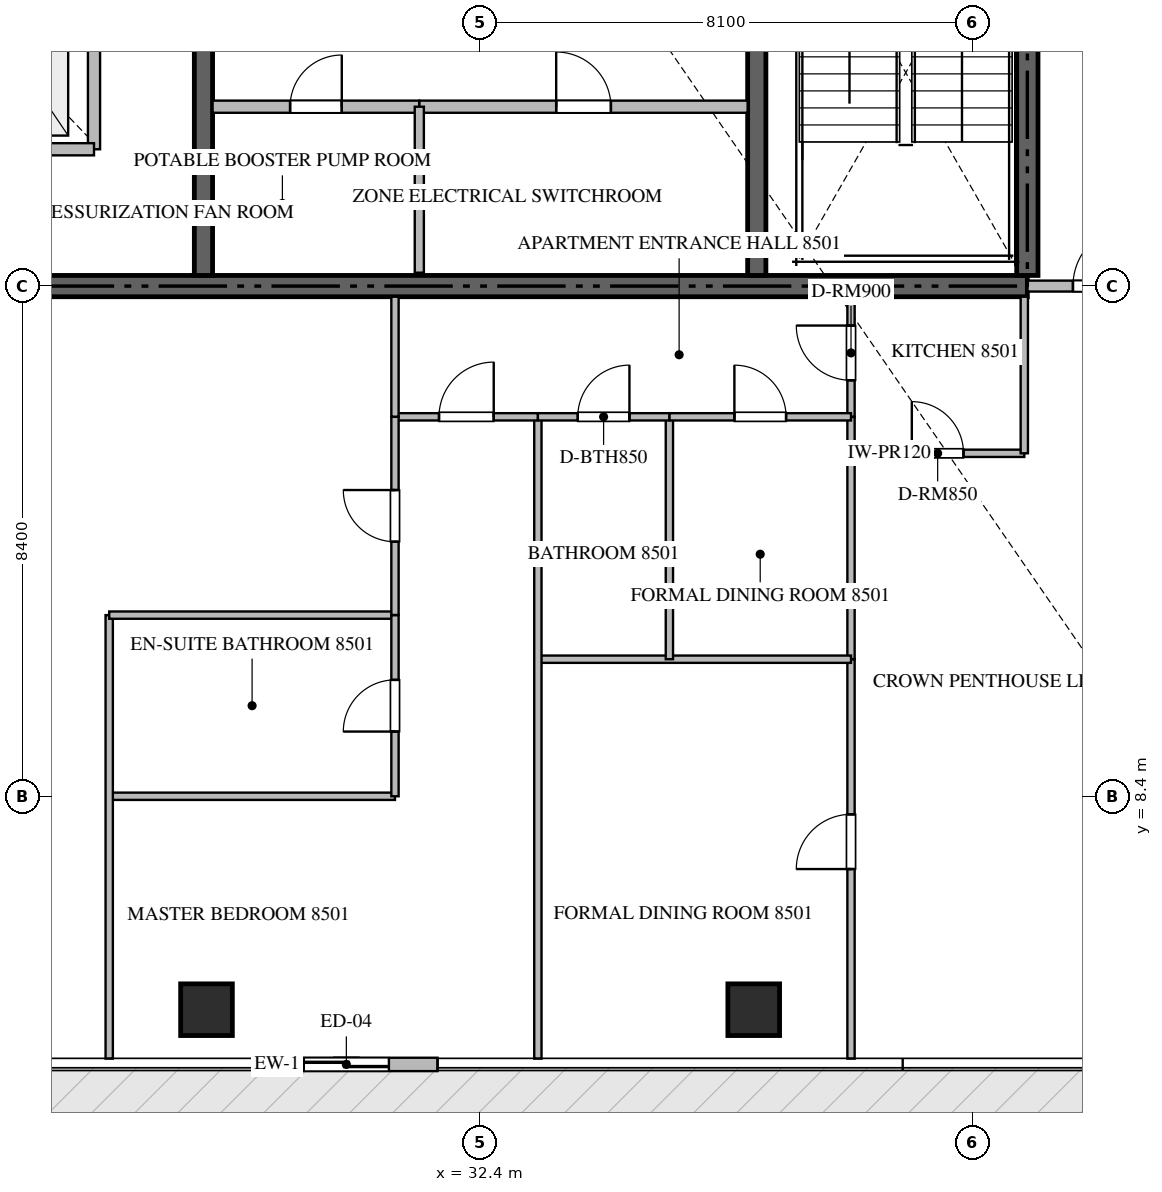
"""IFC4 building model, lengths in metres.
Left out: names, types, materials, properties, quantities, classifications, styles, units other than length and angle.
Written with IfcOpenShell. Run it as: python <this file> out.ifc"""

import sys

from ifc_helpers import new_model, si_unit, direction, frame, frame_2d, origin, origin_2d, place, context, subcontext, project, spatial, rectangle, extrude, source, transform, mapped, element, fill, save


model = new_model("IFC4")
c1 = context("Model", 3, precision=1e-05, world=origin(), true_north=direction((0.0, 1.0)))
c2 = subcontext(c1, "Body", "Model", "MODEL_VIEW")
j1 = project(units=[si_unit("LENGTHUNIT", "METRE"), si_unit("PLANEANGLEUNIT", "RADIAN")], contexts=[c1])
p1 = place(None, origin())
s1 = spatial("IfcSite", under=j1, at=p1, CompositionType="ELEMENT")
p2 = place(p1, origin())
s2 = spatial("IfcBuilding", under=s1, at=p2, CompositionType="ELEMENT")
p3 = place(p2, frame((0.0, 0.0, 342.05)))
s3 = spatial("IfcBuildingStorey", under=s2, at=p3, CompositionType="ELEMENT", Elevation=342.05)
p4 = place(p3, frame((23.4, 16.8, -0.26), z_axis=(0.0, 0.0, 1.0), x_axis=(1.0, 0.0, 0.0)))
e1 = element("IfcWall", 1, at=p4, inside=s3, PredefinedType="SHEAR", context=c2, shape_type="SweptSolid", body=[
    extrude(rectangle(XDim=18.0, YDim=0.35, at=frame_2d((9.0, 0.0))), origin(), (0.0, 0.0, 1.0), 5.898),
])
p5 = place(p3, frame((41.4, 16.975, -0.26), z_axis=(0.0, 0.0, 1.0), x_axis=(0.0, 1.0, 0.0)))
e2 = element("IfcWall", 2, at=p5, inside=s3, PredefinedType="SHEAR", context=c2, shape_type="SweptSolid", body=[
    extrude(rectangle(XDim=8.375, YDim=0.35, at=frame_2d((4.188, 0.0))), origin(), (0.0, 0.0, 1.0), 5.898),
])
p6 = place(p3, frame((27.85, 16.975, -0.26), z_axis=(0.0, 0.0, 1.0), x_axis=(0.0, 1.0, 0.0)))
e3 = element("IfcWall", 3, at=p6, inside=s3, PredefinedType="SHEAR", context=c2, shape_type="SweptSolid", body=[
    extrude(rectangle(XDim=4.875, YDim=0.3, at=frame_2d((2.438, 0.0))), origin(), (0.0, 0.0, 1.0), 5.898),
])
p7 = place(p3, frame((36.95, 16.975, -0.26), z_axis=(0.0, 0.0, 1.0), x_axis=(0.0, 1.0, 0.0)))
e4 = element("IfcWall", 4, at=p7, inside=s3, PredefinedType="SHEAR", context=c2, shape_type="SweptSolid", body=[
    extrude(rectangle(XDim=8.375, YDim=0.3, at=frame_2d((4.188, 0.0))), origin(), (0.0, 0.0, 1.0), 5.898),
])
m1 = source(origin(), c2, "Body", "SweptSolid", [
    extrude(rectangle(XDim=0.85, YDim=0.85, at=origin_2d()), origin(), (0.0, 0.0, 1.0), 5.9),
])
for number, where, z_axis, x_axis in (
    (5, (27.9, 4.9, -0.26), (0.0, 0.0, 1.0), (1.0, 0.0, 0.0)),
    (6, (36.9, 4.9, -0.26), (0.0, 0.0, 1.0), (1.0, 0.0, 0.0)),
):
    element("IfcColumn", number, at=place(p3, frame(where, z_axis=z_axis, x_axis=x_axis)), inside=s3, PredefinedType="COLUMN", context=c2, shape_type="MappedRepresentation", body=[
        mapped(m1, transform((0.0, 0.0, 0.0), scale=1.0)),
    ])
p8 = place(p3, frame((28.7, 4.0, 0.0), z_axis=(0.0, 0.0, 1.0), x_axis=(1.0, 0.0, 0.0)))
e7 = element("IfcWall", 7, at=p8, inside=s3, PredefinedType="ELEMENTEDWALL", context=c2, shape_type="SweptSolid", body=[
    extrude(rectangle(XDim=3.0, YDim=0.22, at=frame_2d((1.5, 0.0))), origin(), (0.0, 0.0, 1.0), 5.625),
])
p9 = place(p8, frame((0.8, 0.0, 0.0)))
e8 = element("IfcOpeningElement", 8, at=p9, cuts=e7, PredefinedType="OPENING", context=c2, shape_type="SweptSolid", body=[
    extrude(rectangle(XDim=1.4, YDim=2.25, at=frame_2d((0.7, 1.125))), frame((0.0, 0.12, 0.0), z_axis=(0.0, -1.0, 0.0), x_axis=(1.0, 0.0, 0.0)), (0.0, 0.0, 1.0), 0.24),
])
p10 = place(p3, frame((26.05, 19.05, 0.0), z_axis=(0.0, 0.0, 1.0), x_axis=(0.0, 1.0, 0.0)))
e9 = element("IfcWall", 9, at=p10, inside=s3, PredefinedType="STANDARD", context=c2, shape_type="SweptSolid", body=[
    extrude(rectangle(XDim=2.5, YDim=0.2, at=frame_2d((1.25, 0.0))), origin(), (0.0, 0.0, 1.0), 5.64),
])
p11 = place(p3, frame((23.575, 19.05, 0.0), z_axis=(0.0, 0.0, 1.0), x_axis=(1.0, 0.0, 0.0)))
e10 = element("IfcWall", 10, at=p11, inside=s3, PredefinedType="STANDARD", context=c2, shape_type="SweptSolid", body=[
    extrude(rectangle(XDim=2.475, YDim=0.2, at=frame_2d((1.238, 0.0))), origin(), (0.0, 0.0, 1.0), 5.64),
])
p12 = place(p3, frame((28.0, 19.75, 0.0), z_axis=(0.0, 0.0, 1.0), x_axis=(1.0, 0.0, 0.0)))
e11 = element("IfcWall", 11, at=p12, inside=s3, PredefinedType="STANDARD", context=c2, shape_type="SweptSolid", body=[
    extrude(rectangle(XDim=3.4, YDim=0.2, at=frame_2d((1.7, 0.0))), origin(), (0.0, 0.0, 1.0), 5.64),
])
p13 = place(p12, frame((1.275, 0.0, 0.0)))
e12 = element("IfcOpeningElement", 12, at=p13, cuts=e11, PredefinedType="OPENING", context=c2, shape_type="SweptSolid", body=[
    extrude(rectangle(XDim=0.85, YDim=2.1, at=frame_2d((0.425, 1.05))), frame((0.0, 0.11, 0.0), z_axis=(0.0, -1.0, 0.0), x_axis=(1.0, 0.0, 0.0)), (0.0, 0.0, 1.0), 0.22),
])
p14 = place(p3, frame((31.402, 19.75, 0.0), z_axis=(0.0, 0.0, 1.0), x_axis=(1.0, 0.0, 0.0)))
e13 = element("IfcWall", 13, at=p14, inside=s3, PredefinedType="STANDARD", context=c2, shape_type="SweptSolid", body=[
    extrude(rectangle(XDim=5.398, YDim=0.2, at=frame_2d((2.699, 0.0))), origin(), (0.0, 0.0, 1.0), 5.64),
])
p15 = place(p14, frame((2.249, 0.0, 0.0)))
e14 = element("IfcOpeningElement", 14, at=p15, cuts=e13, PredefinedType="OPENING", context=c2, shape_type="SweptSolid", body=[
    extrude(rectangle(XDim=0.9, YDim=2.1, at=frame_2d((0.45, 1.05))), frame((0.0, 0.11, 0.0), z_axis=(0.0, -1.0, 0.0), x_axis=(1.0, 0.0, 0.0)), (0.0, 0.0, 1.0), 0.22),
])
p16 = place(p3, frame((31.4, 17.02, 0.0), z_axis=(0.0, 0.0, 1.0), x_axis=(0.0, 1.0, 0.0)))
e15 = element("IfcWall", 15, at=p16, inside=s3, PredefinedType="PARTITIONING", context=c2, shape_type="SweptSolid", body=[
    extrude(rectangle(XDim=2.73, YDim=0.15, at=frame_2d((1.365, 0.0))), origin(), (0.0, 0.0, 1.0), 5.64),
])
p17 = place(p3, frame((41.402, 16.8, 0.0), z_axis=(0.0, 0.0, 1.0), x_axis=(1.0, 0.0, 0.0)))
e16 = element("IfcWall", 16, at=p17, inside=s3, PredefinedType="PARTITIONING", context=c2, shape_type="SweptSolid", body=[
    extrude(rectangle(XDim=2.496, YDim=0.18, at=frame_2d((1.248, 0.0))), origin(), (0.0, 0.0, 1.0), 5.64),
])
p18 = place(p17, frame((0.748, 0.0, 0.0)))
e17 = element("IfcOpeningElement", 17, at=p18, cuts=e16, PredefinedType="OPENING", context=c2, shape_type="SweptSolid", body=[
    extrude(rectangle(XDim=1.0, YDim=2.15, at=frame_2d((0.5, 1.075))), frame((0.0, 0.1, 0.0), z_axis=(0.0, -1.0, 0.0), x_axis=(1.0, 0.0, 0.0)), (0.0, 0.0, 1.0), 0.2),
])
p19 = place(p3, frame((38.5, 14.05, 0.0), z_axis=(0.0, 0.0, 1.0), x_axis=(1.0, 0.0, 0.0)))
e18 = element("IfcWall", 18, at=p19, inside=s3, PredefinedType="PARTITIONING", context=c2, shape_type="SweptSolid", body=[
    extrude(rectangle(XDim=2.85, YDim=0.12, at=frame_2d((1.425, 0.0))), origin(), (0.0, 0.0, 1.0), 5.64),
])
p20 = place(p19, frame((1.0, 0.0, 0.0)))
e19 = element("IfcOpeningElement", 19, at=p20, cuts=e18, PredefinedType="OPENING", context=c2, shape_type="SweptSolid", body=[
    extrude(rectangle(XDim=0.85, YDim=2.1, at=frame_2d((0.425, 1.05))), frame((0.0, 0.07, 0.0), z_axis=(0.0, -1.0, 0.0), x_axis=(1.0, 0.0, 0.0)), (0.0, 0.0, 1.0), 0.14),
])
p21 = place(p3, frame((41.35, 14.05, 0.0), z_axis=(0.0, 0.0, 1.0), x_axis=(0.0, 1.0, 0.0)))
e20 = element("IfcWall", 20, at=p21, inside=s3, PredefinedType="PARTITIONING", context=c2, shape_type="SweptSolid", body=[
    extrude(rectangle(XDim=2.575, YDim=0.12, at=frame_2d((1.288, 0.0))), origin(), (0.0, 0.0, 1.0), 5.64),
])
p22 = place(p3, frame((38.5, 14.65, 0.0), z_axis=(0.0, 0.0, 1.0), x_axis=(0.0, 1.0, 0.0)))
e21 = element("IfcWall", 21, at=p22, inside=s3, PredefinedType="PARTITIONING", context=c2, shape_type="SweptSolid", body=[
    extrude(rectangle(XDim=1.975, YDim=0.12, at=frame_2d((0.988, 0.0))), origin(), (0.0, 0.0, 1.0), 5.64),
])
p23 = place(p22, frame((0.601, 0.0, 0.0)))
e22 = element("IfcOpeningElement", 22, at=p23, cuts=e21, PredefinedType="OPENING", context=c2, shape_type="SweptSolid", body=[
    extrude(rectangle(XDim=0.9, YDim=2.1, at=frame_2d((0.45, 1.05))), frame((0.0, 0.07, 0.0), z_axis=(0.0, -1.0, 0.0), x_axis=(1.0, 0.0, 0.0)), (0.0, 0.0, 1.0), 0.14),
])
p24 = place(p3, frame((38.5, 4.095, 0.0), z_axis=(0.0, 0.0, 1.0), x_axis=(0.0, 1.0, 0.0)))
e23 = element("IfcWall", 23, at=p24, inside=s3, PredefinedType="PARTITIONING", context=c2, shape_type="SweptSolid", body=[
    extrude(rectangle(XDim=6.569, YDim=0.12, at=frame_2d((3.285, 0.0))), origin(), (0.0, 0.0, 1.0), 5.64),
])
p25 = place(p24, frame((3.118, 0.0, 0.0)))
e24 = element("IfcOpeningElement", 24, at=p25, cuts=e23, PredefinedType="OPENING", context=c2, shape_type="SweptSolid", body=[
    extrude(rectangle(XDim=0.9, YDim=2.1, at=frame_2d((0.45, 1.05))), frame((0.0, 0.07, 0.0), z_axis=(0.0, -1.0, 0.0), x_axis=(1.0, 0.0, 0.0)), (0.0, 0.0, 1.0), 0.14),
])
p26 = place(p3, frame((38.5, 10.666, 0.0), z_axis=(0.0, 0.0, 1.0), x_axis=(0.0, 1.0, 0.0)))
e25 = element("IfcWall", 25, at=p26, inside=s3, PredefinedType="PARTITIONING", context=c2, shape_type="SweptSolid", body=[
    extrude(rectangle(XDim=3.982, YDim=0.12, at=frame_2d((1.991, 0.0))), origin(), (0.0, 0.0, 1.0), 5.64),
])
p27 = place(p3, frame((33.35, 10.664, 0.0), z_axis=(0.0, 0.0, 1.0), x_axis=(1.0, 0.0, 0.0)))
e26 = element("IfcWall", 26, at=p27, inside=s3, PredefinedType="PARTITIONING", context=c2, shape_type="SweptSolid", body=[
    extrude(rectangle(XDim=5.15, YDim=0.12, at=frame_2d((2.575, 0.0))), origin(), (0.0, 0.0, 1.0), 5.64),
])
p28 = place(p3, frame((33.35, 4.095, 0.0), z_axis=(0.0, 0.0, 1.0), x_axis=(0.0, 1.0, 0.0)))
e27 = element("IfcWall", 27, at=p28, inside=s3, PredefinedType="PARTITIONING", context=c2, shape_type="SweptSolid", body=[
    extrude(rectangle(XDim=10.555, YDim=0.12, at=frame_2d((5.277, 0.0))), origin(), (0.0, 0.0, 1.0), 5.64),
])
p29 = place(p3, frame((35.513, 10.664, 0.0), z_axis=(0.0, 0.0, 1.0), x_axis=(0.0, 1.0, 0.0)))
e28 = element("IfcWall", 28, at=p29, inside=s3, PredefinedType="PARTITIONING", context=c2, shape_type="SweptSolid", body=[
    extrude(rectangle(XDim=3.986, YDim=0.12, at=frame_2d((1.993, 0.0))), origin(), (0.0, 0.0, 1.0), 5.64),
])
p30 = place(p3, frame((33.35, 14.65, 0.0), z_axis=(0.0, 0.0, 1.0), x_axis=(1.0, 0.0, 0.0)))
e29 = element("IfcWall", 29, at=p30, inside=s3, PredefinedType="PARTITIONING", context=c2, shape_type="SweptSolid", body=[
    extrude(rectangle(XDim=2.163, YDim=0.12, at=frame_2d((1.082, 0.0))), origin(), (0.0, 0.0, 1.0), 5.64),
])
p31 = place(p30, frame((0.656, 0.0, 0.0)))
e30 = element("IfcOpeningElement", 30, at=p31, cuts=e29, PredefinedType="OPENING", context=c2, shape_type="SweptSolid", body=[
    extrude(rectangle(XDim=0.85, YDim=2.1, at=frame_2d((0.425, 1.05))), frame((0.0, 0.07, 0.0), z_axis=(0.0, -1.0, 0.0), x_axis=(1.0, 0.0, 0.0)), (0.0, 0.0, 1.0), 0.14),
])
p32 = place(p3, frame((35.515, 14.65, 0.0), z_axis=(0.0, 0.0, 1.0), x_axis=(1.0, 0.0, 0.0)))
e31 = element("IfcWall", 31, at=p32, inside=s3, PredefinedType="PARTITIONING", context=c2, shape_type="SweptSolid", body=[
    extrude(rectangle(XDim=2.985, YDim=0.12, at=frame_2d((1.493, 0.0))), origin(), (0.0, 0.0, 1.0), 5.64),
])
p33 = place(p32, frame((1.067, 0.0, 0.0)))
e32 = element("IfcOpeningElement", 32, at=p33, cuts=e31, PredefinedType="OPENING", context=c2, shape_type="SweptSolid", body=[
    extrude(rectangle(XDim=0.85, YDim=2.1, at=frame_2d((0.425, 1.05))), frame((0.0, 0.07, 0.0), z_axis=(0.0, -1.0, 0.0), x_axis=(1.0, 0.0, 0.0)), (0.0, 0.0, 1.0), 0.14),
])
p34 = place(p3, frame((31.0, 14.65, 0.0), z_axis=(0.0, 0.0, 1.0), x_axis=(1.0, 0.0, 0.0)))
e33 = element("IfcWall", 33, at=p34, inside=s3, PredefinedType="PARTITIONING", context=c2, shape_type="SweptSolid", body=[
    extrude(rectangle(XDim=2.348, YDim=0.12, at=frame_2d((1.174, 0.0))), origin(), (0.0, 0.0, 1.0), 5.64),
])
p35 = place(p34, frame((0.724, 0.0, 0.0)))
e34 = element("IfcOpeningElement", 34, at=p35, cuts=e33, PredefinedType="OPENING", context=c2, shape_type="SweptSolid", body=[
    extrude(rectangle(XDim=0.9, YDim=2.1, at=frame_2d((0.45, 1.05))), frame((0.0, 0.07, 0.0), z_axis=(0.0, -1.0, 0.0), x_axis=(1.0, 0.0, 0.0)), (0.0, 0.0, 1.0), 0.14),
])
p36 = place(p3, frame((26.3, 8.41, 0.0), z_axis=(0.0, 0.0, 1.0), x_axis=(1.0, 0.0, 0.0)))
e35 = element("IfcWall", 35, at=p36, inside=s3, PredefinedType="PARTITIONING", context=c2, shape_type="SweptSolid", body=[
    extrude(rectangle(XDim=4.7, YDim=0.12, at=frame_2d((2.35, 0.0))), origin(), (0.0, 0.0, 1.0), 5.64),
])
p37 = place(p3, frame((26.3, 4.095, 0.0), z_axis=(0.0, 0.0, 1.0), x_axis=(0.0, 1.0, 0.0)))
e36 = element("IfcWall", 36, at=p37, inside=s3, PredefinedType="PARTITIONING", context=c2, shape_type="SweptSolid", body=[
    extrude(rectangle(XDim=7.294, YDim=0.12, at=frame_2d((3.647, 0.0))), origin(), (0.0, 0.0, 1.0), 5.64),
])
p38 = place(p3, frame((26.3, 11.389, 0.0), z_axis=(0.0, 0.0, 1.0), x_axis=(1.0, 0.0, 0.0)))
e37 = element("IfcWall", 37, at=p38, inside=s3, PredefinedType="PARTITIONING", context=c2, shape_type="SweptSolid", body=[
    extrude(rectangle(XDim=4.7, YDim=0.12, at=frame_2d((2.35, 0.0))), origin(), (0.0, 0.0, 1.0), 5.64),
])
p39 = place(p3, frame((31.0, 8.41, 0.0), z_axis=(0.0, 0.0, 1.0), x_axis=(0.0, 1.0, 0.0)))
e38 = element("IfcWall", 38, at=p39, inside=s3, PredefinedType="PARTITIONING", context=c2, shape_type="SweptSolid", body=[
    extrude(rectangle(XDim=2.979, YDim=0.12, at=frame_2d((1.49, 0.0))), origin(), (0.0, 0.0, 1.0), 5.64),
])
p40 = place(p39, frame((1.064, 0.0, 0.0)))
e39 = element("IfcOpeningElement", 39, at=p40, cuts=e38, PredefinedType="OPENING", context=c2, shape_type="SweptSolid", body=[
    extrude(rectangle(XDim=0.85, YDim=2.1, at=frame_2d((0.425, 1.05))), frame((0.0, 0.07, 0.0), z_axis=(0.0, -1.0, 0.0), x_axis=(1.0, 0.0, 0.0)), (0.0, 0.0, 1.0), 0.14),
])
p41 = place(p3, frame((31.0, 11.391, 0.0), z_axis=(0.0, 0.0, 1.0), x_axis=(0.0, 1.0, 0.0)))
e40 = element("IfcWall", 40, at=p41, inside=s3, PredefinedType="PARTITIONING", context=c2, shape_type="SweptSolid", body=[
    extrude(rectangle(XDim=3.259, YDim=0.12, at=frame_2d((1.629, 0.0))), origin(), (0.0, 0.0, 1.0), 5.64),
])
p42 = place(p41, frame((1.205, 0.0, 0.0)))
e41 = element("IfcOpeningElement", 41, at=p42, cuts=e40, PredefinedType="OPENING", context=c2, shape_type="SweptSolid", body=[
    extrude(rectangle(XDim=0.85, YDim=2.1, at=frame_2d((0.425, 1.05))), frame((0.0, 0.07, 0.0), z_axis=(0.0, -1.0, 0.0), x_axis=(1.0, 0.0, 0.0)), (0.0, 0.0, 1.0), 0.14),
])
p43 = place(p3, frame((31.0, 14.652, 0.0), z_axis=(0.0, 0.0, 1.0), x_axis=(0.0, 1.0, 0.0)))
e42 = element("IfcWall", 42, at=p43, inside=s3, PredefinedType="PARTITIONING", context=c2, shape_type="SweptSolid", body=[
    extrude(rectangle(XDim=1.973, YDim=0.12, at=frame_2d((0.986, 0.0))), origin(), (0.0, 0.0, 1.0), 5.64),
])
m2 = source(origin(), c2, "Body", "SweptSolid", [
    extrude(rectangle(XDim=1.4, YDim=2.25, at=frame_2d((0.7, 1.125))), frame((0.0, 0.025, 0.0), z_axis=(0.0, -1.0, 0.0), x_axis=(1.0, 0.0, 0.0)), (0.0, 0.0, 1.0), 0.05),
])
p44 = place(p9, origin())
e43 = element("IfcDoor", 43, at=p44, inside=s3, OperationType="SLIDING_TO_LEFT", PredefinedType="DOOR", context=c2, shape_type="MappedRepresentation", body=[
    mapped(m2, transform((0.0, 0.0, 0.0), scale=1.0)),
])
fill(e8, e43)
m3 = source(origin(), c2, "Body", "SweptSolid", [
    extrude(rectangle(XDim=0.85, YDim=2.1, at=frame_2d((0.425, 1.05))), frame((0.0, 0.025, 0.0), z_axis=(0.0, -1.0, 0.0), x_axis=(1.0, 0.0, 0.0)), (0.0, 0.0, 1.0), 0.05),
])
p45 = place(p13, origin())
e44 = element("IfcDoor", 44, at=p45, inside=s3, OperationType="SINGLE_SWING_RIGHT", PredefinedType="DOOR", context=c2, shape_type="MappedRepresentation", body=[
    mapped(m3, transform((0.0, 0.0, 0.0), scale=1.0)),
])
fill(e12, e44)
m4 = source(origin(), c2, "Body", "SweptSolid", [
    extrude(rectangle(XDim=0.9, YDim=2.1, at=frame_2d((0.45, 1.05))), frame((0.0, 0.025, 0.0), z_axis=(0.0, -1.0, 0.0), x_axis=(1.0, 0.0, 0.0)), (0.0, 0.0, 1.0), 0.05),
])
p46 = place(p15, origin())
e45 = element("IfcDoor", 45, at=p46, inside=s3, OperationType="SINGLE_SWING_LEFT", PredefinedType="DOOR", context=c2, shape_type="MappedRepresentation", body=[
    mapped(m4, transform((0.0, 0.0, 0.0), scale=1.0)),
])
fill(e14, e45)
m5 = source(origin(), c2, "Body", "SweptSolid", [
    extrude(rectangle(XDim=1.0, YDim=2.15, at=frame_2d((0.5, 1.075))), frame((0.0, 0.025, 0.0), z_axis=(0.0, -1.0, 0.0), x_axis=(1.0, 0.0, 0.0)), (0.0, 0.0, 1.0), 0.05),
])
p47 = place(p18, origin())
e46 = element("IfcDoor", 46, at=p47, inside=s3, OperationType="SINGLE_SWING_RIGHT", PredefinedType="DOOR", context=c2, shape_type="MappedRepresentation", body=[
    mapped(m5, transform((0.0, 0.0, 0.0), scale=1.0)),
])
fill(e17, e46)
p48 = place(p20, origin())
e47 = element("IfcDoor", 47, at=p48, inside=s3, OperationType="SINGLE_SWING_LEFT", PredefinedType="DOOR", context=c2, shape_type="MappedRepresentation", body=[
    mapped(m3, transform((0.0, 0.0, 0.0), scale=1.0)),
])
fill(e19, e47)
p49 = place(p23, origin())
e48 = element("IfcDoor", 48, at=p49, inside=s3, OperationType="SINGLE_SWING_RIGHT", PredefinedType="DOOR", context=c2, shape_type="MappedRepresentation", body=[
    mapped(m4, transform((0.0, 0.0, 0.0), scale=1.0)),
])
fill(e22, e48)
p50 = place(p25, origin())
e49 = element("IfcDoor", 49, at=p50, inside=s3, OperationType="SINGLE_SWING_LEFT", PredefinedType="DOOR", context=c2, shape_type="MappedRepresentation", body=[
    mapped(m4, transform((0.0, 0.0, 0.0), scale=1.0)),
])
fill(e24, e49)
p51 = place(p31, origin())
e50 = element("IfcDoor", 50, at=p51, inside=s3, OperationType="SINGLE_SWING_RIGHT", PredefinedType="DOOR", context=c2, shape_type="MappedRepresentation", body=[
    mapped(m3, transform((0.0, 0.0, 0.0), scale=1.0)),
])
fill(e30, e50)
p52 = place(p33, origin())
e51 = element("IfcDoor", 51, at=p52, inside=s3, OperationType="SINGLE_SWING_LEFT", PredefinedType="DOOR", context=c2, shape_type="MappedRepresentation", body=[
    mapped(m3, transform((0.0, 0.0, 0.0), scale=1.0)),
])
fill(e32, e51)
p53 = place(p35, origin())
e52 = element("IfcDoor", 52, at=p53, inside=s3, OperationType="SINGLE_SWING_RIGHT", PredefinedType="DOOR", context=c2, shape_type="MappedRepresentation", body=[
    mapped(m4, transform((0.0, 0.0, 0.0), scale=1.0)),
])
fill(e34, e52)
p54 = place(p40, origin())
e53 = element("IfcDoor", 53, at=p54, inside=s3, OperationType="SINGLE_SWING_LEFT", PredefinedType="DOOR", context=c2, shape_type="MappedRepresentation", body=[
    mapped(m3, transform((0.0, 0.0, 0.0), scale=1.0)),
])
fill(e39, e53)
p55 = place(p42, origin())
e54 = element("IfcDoor", 54, at=p55, inside=s3, OperationType="SINGLE_SWING_RIGHT", PredefinedType="DOOR", context=c2, shape_type="MappedRepresentation", body=[
    mapped(m3, transform((0.0, 0.0, 0.0), scale=1.0)),
])
fill(e41, e54)
save(model, sys.argv[1])
